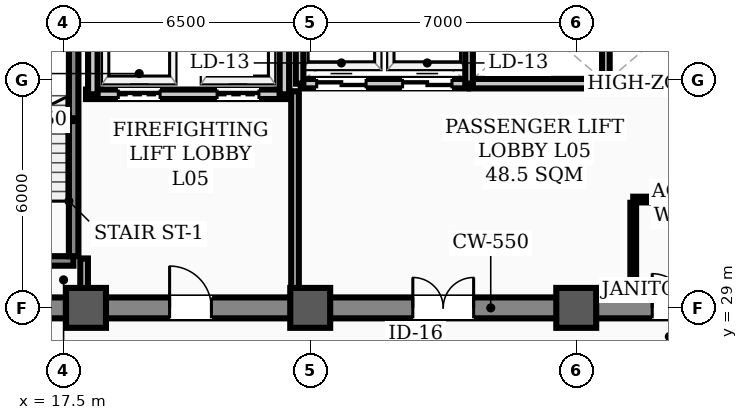
"""IFC4 building model, lengths in metres.
Left out: names, types, materials, properties, quantities, classifications, styles, units other than length and angle.
Written with IfcOpenShell. Run it as: python <this file> out.ifc"""

import sys

from ifc_helpers import new_model, si_unit, direction, frame, frame_2d, origin, origin_2d, place, context, subcontext, project, spatial, rectangle, hollow_rectangle, extrude, element, fill, save


model = new_model("IFC4")
c1 = context("Model", 3, precision=1e-05, world=origin(), true_north=direction((0.0, 1.0)))
c2 = subcontext(c1, "Body", "Model", "MODEL_VIEW")
j1 = project(units=[si_unit("LENGTHUNIT", "METRE"), si_unit("PLANEANGLEUNIT", "RADIAN")], contexts=[c1])
p1 = place(None, origin())
s1 = spatial("IfcSite", under=j1, at=p1, CompositionType="ELEMENT")
p2 = place(p1, origin())
s2 = spatial("IfcBuilding", under=s1, at=p2, CompositionType="ELEMENT")
p3 = place(p2, frame((0.0, 0.0, 22.0)))
s3 = spatial("IfcBuildingStorey", under=s2, at=p3, CompositionType="ELEMENT", Elevation=22.0)
for number, where, z_axis, x_axis in (
    (1, (18.1, 29.0, 0.0), (0.0, 0.0, 1.0), (1.0, 0.0, 0.0)),
    (2, (24.0, 29.0, 0.0), (0.0, 0.0, 1.0), (1.0, 0.0, 0.0)),
    (3, (31.0, 29.0, 0.0), (0.0, 0.0, 1.0), (1.0, 0.0, 0.0)),
):
    element("IfcColumn", number, at=place(p3, frame(where, z_axis=z_axis, x_axis=x_axis)), inside=s3, PredefinedType="COLUMN", context=c2, shape_type="SweptSolid", body=[
        extrude(hollow_rectangle(XDim=1.05, YDim=1.05, WallThickness=0.038, InnerFilletRadius=0.019, OuterFilletRadius=0.057, at=origin_2d()), origin(), (0.0, 0.0, 1.0), 4.5),
    ])
p4 = place(p3, frame((13.5, 29.0, 0.0), z_axis=(0.0, 0.0, 1.0), x_axis=(1.0, 0.0, 0.0)))
e4 = element("IfcWall", 4, at=p4, inside=s3, PredefinedType="SHEAR", context=c2, shape_type="SweptSolid", body=[
    extrude(rectangle(XDim=30.5, YDim=0.55, at=frame_2d((15.25, 0.0))), origin(), (0.0, 0.0, 1.0), 4.32),
])
p5 = place(p4, frame((1.75, 0.0, 0.0)))
e5 = element("IfcOpeningElement", 5, at=p5, cuts=e4, PredefinedType="OPENING", context=c2, shape_type="SweptSolid", body=[
    extrude(rectangle(XDim=1.1, YDim=2.08, at=frame_2d((0.55, 1.04))), frame((0.0, 0.285, 0.0), z_axis=(0.0, -1.0, 0.0), x_axis=(1.0, 0.0, 0.0)), (0.0, 0.0, 1.0), 0.57),
])
p6 = place(p4, frame((26.7, 0.0, 0.0)))
e6 = element("IfcOpeningElement", 6, at=p6, cuts=e4, PredefinedType="OPENING", context=c2, shape_type="SweptSolid", body=[
    extrude(rectangle(XDim=1.1, YDim=2.08, at=frame_2d((0.55, 1.04))), frame((0.0, 0.285, 0.0), z_axis=(0.0, -1.0, 0.0), x_axis=(1.0, 0.0, 0.0)), (0.0, 0.0, 1.0), 0.57),
])
p7 = place(p4, frame((6.8, 0.0, 0.0)))
e7 = element("IfcOpeningElement", 7, at=p7, cuts=e4, PredefinedType="OPENING", context=c2, shape_type="SweptSolid", body=[
    extrude(rectangle(XDim=1.1, YDim=2.08, at=frame_2d((0.55, 1.04))), frame((0.0, 0.285, 0.0), z_axis=(0.0, -1.0, 0.0), x_axis=(1.0, 0.0, 0.0)), (0.0, 0.0, 1.0), 0.57),
])
p8 = place(p4, frame((13.2, 0.0, 0.0)))
e8 = element("IfcOpeningElement", 8, at=p8, cuts=e4, PredefinedType="OPENING", context=c2, shape_type="SweptSolid", body=[
    extrude(rectangle(XDim=1.6, YDim=2.08, at=frame_2d((0.8, 1.04))), frame((0.0, 0.285, 0.0), z_axis=(0.0, -1.0, 0.0), x_axis=(1.0, 0.0, 0.0)), (0.0, 0.0, 1.0), 0.57),
])
p9 = place(p4, frame((19.5, 0.0, 0.0)))
e9 = element("IfcOpeningElement", 9, at=p9, cuts=e4, PredefinedType="OPENING", context=c2, shape_type="SweptSolid", body=[
    extrude(rectangle(XDim=0.9, YDim=2.08, at=frame_2d((0.45, 1.04))), frame((0.0, 0.285, 0.0), z_axis=(0.0, -1.0, 0.0), x_axis=(1.0, 0.0, 0.0)), (0.0, 0.0, 1.0), 0.57),
])
p10 = place(p4, frame((21.55, 0.0, 0.0)))
e10 = element("IfcOpeningElement", 10, at=p10, cuts=e4, PredefinedType="OPENING", context=c2, shape_type="SweptSolid", body=[
    extrude(rectangle(XDim=0.9, YDim=2.08, at=frame_2d((0.45, 1.04))), frame((0.0, 0.285, 0.0), z_axis=(0.0, -1.0, 0.0), x_axis=(1.0, 0.0, 0.0)), (0.0, 0.0, 1.0), 0.57),
])
p11 = place(p3, frame((14.43, 30.235, 0.0), z_axis=(0.0, 0.0, 1.0), x_axis=(1.0, 0.0, 0.0)))
e11 = element("IfcWall", 11, at=p11, inside=s3, PredefinedType="STANDARD", context=c2, shape_type="SweptSolid", body=[
    extrude(rectangle(XDim=3.34, YDim=0.25, at=frame_2d((1.67, 0.0))), origin(), (0.0, 0.0, 1.0), 4.32),
])
p12 = place(p11, frame((1.1, 0.0, 0.0)))
e12 = element("IfcOpeningElement", 12, at=p12, cuts=e11, PredefinedType="OPENING", context=c2, shape_type="SweptSolid", body=[
    extrude(rectangle(XDim=1.1, YDim=2.08, at=frame_2d((0.55, 1.04))), frame((0.0, 0.135, 0.0), z_axis=(0.0, -1.0, 0.0), x_axis=(1.0, 0.0, 0.0)), (0.0, 0.0, 1.0), 0.27),
])
p13 = place(p3, frame((17.775, 30.36, 0.0), z_axis=(0.0, 0.0, 1.0), x_axis=(0.0, 1.0, 0.0)))
e13 = element("IfcWall", 13, at=p13, inside=s3, PredefinedType="STANDARD", context=c2, shape_type="SweptSolid", body=[
    extrude(rectangle(XDim=7.184, YDim=0.25, at=frame_2d((3.592, 0.0))), origin(), (0.0, 0.0, 1.0), 4.32),
])
p14 = place(p3, frame((18.1, 34.62, 0.0), z_axis=(0.0, 0.0, 1.0), x_axis=(1.0, 0.0, 0.0)))
e14 = element("IfcWall", 14, at=p14, inside=s3, PredefinedType="STANDARD", context=c2, shape_type="SweptSolid", body=[
    extrude(rectangle(XDim=5.35, YDim=0.25, at=frame_2d((2.675, 0.0))), origin(), (0.0, 0.0, 1.0), 4.32),
])
p15 = place(p14, frame((0.85, 0.0, 0.0)))
e15 = element("IfcOpeningElement", 15, at=p15, cuts=e14, PredefinedType="OPENING", context=c2, shape_type="SweptSolid", body=[
    extrude(rectangle(XDim=1.1, YDim=2.08, at=frame_2d((0.55, 1.04))), frame((0.0, 0.135, 0.0), z_axis=(0.0, -1.0, 0.0), x_axis=(1.0, 0.0, 0.0)), (0.0, 0.0, 1.0), 0.27),
])
p16 = place(p14, frame((3.45, 0.0, 0.0)))
e16 = element("IfcOpeningElement", 16, at=p16, cuts=e14, PredefinedType="OPENING", context=c2, shape_type="SweptSolid", body=[
    extrude(rectangle(XDim=1.1, YDim=2.08, at=frame_2d((0.55, 1.04))), frame((0.0, 0.135, 0.0), z_axis=(0.0, -1.0, 0.0), x_axis=(1.0, 0.0, 0.0)), (0.0, 0.0, 1.0), 0.27),
])
for number, where, z_axis, x_axis in (
    (17, (18.28, 34.62, 0.0), (0.0, 0.0, 1.0), (0.0, 1.0, 0.0)),
    (18, (23.32, 34.62, 0.0), (0.0, 0.0, 1.0), (0.0, 1.0, 0.0)),
):
    element("IfcWall", number, at=place(p3, frame(where, z_axis=z_axis, x_axis=x_axis)), inside=s3, PredefinedType="STANDARD", context=c2, shape_type="SweptSolid", body=[
        extrude(rectangle(XDim=3.33, YDim=0.25, at=frame_2d((1.665, 0.0))), origin(), (0.0, 0.0, 1.0), 3.9),
    ])
p17 = place(p3, frame((23.75, 34.9, 0.0), z_axis=(0.0, 0.0, 1.0), x_axis=(1.0, 0.0, 0.0)))
e19 = element("IfcWall", 19, at=p17, inside=s3, PredefinedType="STANDARD", context=c2, shape_type="SweptSolid", body=[
    extrude(rectangle(XDim=4.4, YDim=0.25, at=frame_2d((2.2, 0.0))), origin(), (0.0, 0.0, 1.0), 4.32),
])
p18 = place(p17, frame((0.42, 0.0, 0.0)))
e20 = element("IfcOpeningElement", 20, at=p18, cuts=e19, PredefinedType="OPENING", context=c2, shape_type="SweptSolid", body=[
    extrude(rectangle(XDim=1.3, YDim=2.08, at=frame_2d((0.65, 1.04))), frame((0.0, 0.135, 0.0), z_axis=(0.0, -1.0, 0.0), x_axis=(1.0, 0.0, 0.0)), (0.0, 0.0, 1.0), 0.27),
])
p19 = place(p17, frame((2.68, 0.0, 0.0)))
e21 = element("IfcOpeningElement", 21, at=p19, cuts=e19, PredefinedType="OPENING", context=c2, shape_type="SweptSolid", body=[
    extrude(rectangle(XDim=1.3, YDim=2.08, at=frame_2d((0.65, 1.04))), frame((0.0, 0.135, 0.0), z_axis=(0.0, -1.0, 0.0), x_axis=(1.0, 0.0, 0.0)), (0.0, 0.0, 1.0), 0.27),
])
p20 = place(p3, frame((28.2, 34.9, 0.0), z_axis=(0.0, 0.0, 1.0), x_axis=(1.0, 0.0, 0.0)))
e22 = element("IfcWall", 22, at=p20, inside=s3, PredefinedType="STANDARD", context=c2, shape_type="SweptSolid", body=[
    extrude(rectangle(XDim=3.55, YDim=0.25, at=frame_2d((1.775, 0.0))), origin(), (0.0, 0.0, 1.0), 4.32),
])
p21 = place(p3, frame((31.8, 34.9, 0.0), z_axis=(0.0, 0.0, 1.0), x_axis=(1.0, 0.0, 0.0)))
e23 = element("IfcWall", 23, at=p21, inside=s3, PredefinedType="STANDARD", context=c2, shape_type="SweptSolid", body=[
    extrude(rectangle(XDim=3.6, YDim=0.25, at=frame_2d((1.8, 0.0))), origin(), (0.0, 0.0, 1.0), 4.32),
])
p22 = place(p3, frame((32.5, 31.85, 0.0), z_axis=(0.0, 0.0, 1.0), x_axis=(1.0, 0.0, 0.0)))
e24 = element("IfcWall", 24, at=p22, inside=s3, PredefinedType="PARTITIONING", context=c2, shape_type="SweptSolid", body=[
    extrude(rectangle(XDim=4.1, YDim=0.15, at=frame_2d((2.05, 0.0))), origin(), (0.0, 0.0, 1.0), 4.32),
])
p23 = place(p3, frame((18.05, 29.285, 0.0), z_axis=(0.0, 0.0, 1.0), x_axis=(0.0, 1.0, 0.0)))
e25 = element("IfcWall", 25, at=p23, inside=s3, PredefinedType="STANDARD", context=c2, shape_type="SweptSolid", body=[
    extrude(rectangle(XDim=1.015, YDim=0.2, at=frame_2d((0.508, 0.0))), origin(), (0.0, 0.0, 1.0), 3.9),
])
p24 = place(p3, frame((23.6, 29.285, 0.0), z_axis=(0.0, 0.0, 1.0), x_axis=(0.0, 1.0, 0.0)))
e26 = element("IfcWall", 26, at=p24, inside=s3, PredefinedType="STANDARD", context=c2, shape_type="SweptSolid", body=[
    extrude(rectangle(XDim=5.415, YDim=0.2, at=frame_2d((2.708, 0.0))), origin(), (0.0, 0.0, 1.0), 3.7),
])
p25 = place(p3, frame((32.5, 29.285, 0.0), z_axis=(0.0, 0.0, 1.0), x_axis=(0.0, 1.0, 0.0)))
e27 = element("IfcWall", 27, at=p25, inside=s3, PredefinedType="PARTITIONING", context=c2, shape_type="SweptSolid", body=[
    extrude(rectangle(XDim=2.48, YDim=0.15, at=frame_2d((1.24, 0.0))), origin(), (0.0, 0.0, 1.0), 3.9),
])
p26 = place(p3, frame((23.72, 34.9, 0.0), z_axis=(0.0, 0.0, 1.0), x_axis=(0.0, 1.0, 0.0)))
e28 = element("IfcWall", 28, at=p26, inside=s3, PredefinedType="STANDARD", context=c2, shape_type="SweptSolid", body=[
    extrude(rectangle(XDim=3.12, YDim=0.2, at=frame_2d((1.56, 0.0))), origin(), (0.0, 0.0, 1.0), 3.7),
])
for number, where, z_axis, x_axis in (
    (29, (28.18, 34.9, 0.0), (0.0, 0.0, 1.0), (0.0, 1.0, 0.0)),
    (30, (31.78, 34.9, 0.0), (0.0, 0.0, 1.0), (0.0, 1.0, 0.0)),
):
    element("IfcWall", number, at=place(p3, frame(where, z_axis=z_axis, x_axis=x_axis)), inside=s3, PredefinedType="STANDARD", context=c2, shape_type="SweptSolid", body=[
        extrude(rectangle(XDim=3.12, YDim=0.2, at=frame_2d((1.56, 0.0))), origin(), (0.0, 0.0, 1.0), 3.9),
    ])
p27 = place(p7, origin())
e31 = element("IfcDoor", 31, at=p27, inside=s3, OperationType="SINGLE_SWING_LEFT", PredefinedType="DOOR", context=c2, shape_type="SweptSolid", body=[
    extrude(rectangle(XDim=1.1, YDim=2.08, at=frame_2d((0.55, 1.04))), frame((0.0, 0.025, 0.0), z_axis=(0.0, -1.0, 0.0), x_axis=(1.0, 0.0, 0.0)), (0.0, 0.0, 1.0), 0.05),
])
fill(e7, e31)
p28 = place(p8, origin())
e32 = element("IfcDoor", 32, at=p28, inside=s3, OperationType="DOUBLE_DOOR_SINGLE_SWING", PredefinedType="DOOR", context=c2, shape_type="SweptSolid", body=[
    extrude(rectangle(XDim=1.6, YDim=2.08, at=frame_2d((0.8, 1.04))), frame((0.0, 0.025, 0.0), z_axis=(0.0, -1.0, 0.0), x_axis=(1.0, 0.0, 0.0)), (0.0, 0.0, 1.0), 0.05),
])
fill(e8, e32)
p29 = place(p9, origin())
e33 = element("IfcDoor", 33, at=p29, inside=s3, OperationType="SINGLE_SWING_LEFT", PredefinedType="DOOR", context=c2, shape_type="SweptSolid", body=[
    extrude(rectangle(XDim=0.9, YDim=2.08, at=frame_2d((0.45, 1.04))), frame((0.0, 0.025, 0.0), z_axis=(0.0, -1.0, 0.0), x_axis=(1.0, 0.0, 0.0)), (0.0, 0.0, 1.0), 0.05),
])
fill(e9, e33)
p30 = place(p15, origin())
e34 = element("IfcDoor", 34, at=p30, inside=s3, OperationType="SLIDING_TO_LEFT", PredefinedType="DOOR", context=c2, shape_type="SweptSolid", body=[
    extrude(rectangle(XDim=1.1, YDim=2.08, at=frame_2d((0.55, 1.04))), frame((0.0, 0.025, 0.0), z_axis=(0.0, -1.0, 0.0), x_axis=(1.0, 0.0, 0.0)), (0.0, 0.0, 1.0), 0.05),
])
fill(e15, e34)
p31 = place(p16, origin())
e35 = element("IfcDoor", 35, at=p31, inside=s3, OperationType="SLIDING_TO_LEFT", PredefinedType="DOOR", context=c2, shape_type="SweptSolid", body=[
    extrude(rectangle(XDim=1.1, YDim=2.08, at=frame_2d((0.55, 1.04))), frame((0.0, 0.025, 0.0), z_axis=(0.0, -1.0, 0.0), x_axis=(1.0, 0.0, 0.0)), (0.0, 0.0, 1.0), 0.05),
])
fill(e16, e35)
p32 = place(p18, origin())
e36 = element("IfcDoor", 36, at=p32, inside=s3, OperationType="DOUBLE_DOOR_SLIDING", PredefinedType="DOOR", context=c2, shape_type="SweptSolid", body=[
    extrude(rectangle(XDim=1.3, YDim=2.08, at=frame_2d((0.65, 1.04))), frame((0.0, 0.025, 0.0), z_axis=(0.0, -1.0, 0.0), x_axis=(1.0, 0.0, 0.0)), (0.0, 0.0, 1.0), 0.05),
])
fill(e20, e36)
p33 = place(p19, origin())
e37 = element("IfcDoor", 37, at=p33, inside=s3, OperationType="DOUBLE_DOOR_SLIDING", PredefinedType="DOOR", context=c2, shape_type="SweptSolid", body=[
    extrude(rectangle(XDim=1.3, YDim=2.08, at=frame_2d((0.65, 1.04))), frame((0.0, 0.025, 0.0), z_axis=(0.0, -1.0, 0.0), x_axis=(1.0, 0.0, 0.0)), (0.0, 0.0, 1.0), 0.05),
])
fill(e21, e37)
save(model, sys.argv[1])
